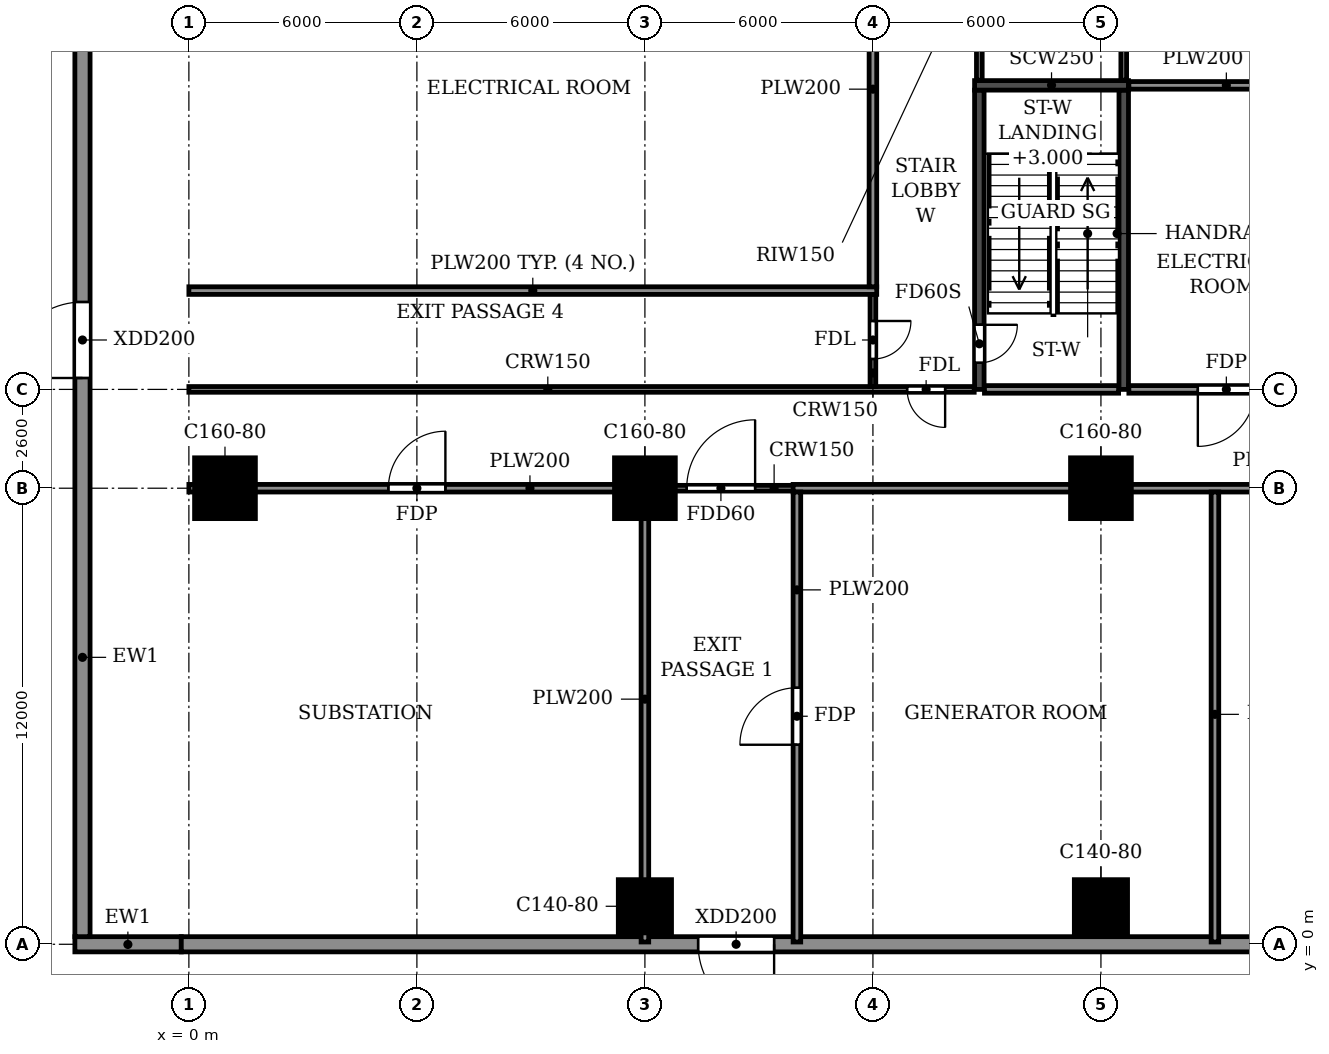
"""IFC4 building model, lengths in metres.
Left out: names, types, materials, properties, quantities, classifications, styles, units other than length and angle.
Written with IfcOpenShell. Run it as: python <this file> out.ifc"""

import sys

from ifc_helpers import new_model, si_unit, direction, frame, frame_2d, origin, origin_2d, place, context, subcontext, project, spatial, rectangle, extrude, source, transform, mapped, element, fill, save


model = new_model("IFC4")
c1 = context("Model", 3, precision=1e-05, world=origin(), true_north=direction((0.0, 1.0)))
c2 = subcontext(c1, "Body", "Model", "MODEL_VIEW")
j1 = project(units=[si_unit("LENGTHUNIT", "METRE"), si_unit("PLANEANGLEUNIT", "RADIAN")], contexts=[c1])
p1 = place(None, origin())
s1 = spatial("IfcSite", under=j1, at=p1, CompositionType="ELEMENT")
p2 = place(p1, origin())
s2 = spatial("IfcBuilding", under=s1, at=p2, CompositionType="ELEMENT")
p3 = place(p2, origin())
s3 = spatial("IfcBuildingStorey", under=s2, at=p3, CompositionType="ELEMENT", Elevation=0.0)
m1 = source(origin(), c2, "Body", "SweptSolid", [
    extrude(rectangle(XDim=1.6, YDim=1.6, at=origin_2d()), origin(), (0.0, 0.0, 1.0), 4.5),
])
p4 = place(p3, frame((0.95, 12.0, -0.3), z_axis=(0.0, 0.0, 1.0), x_axis=(1.0, 0.0, 0.0)))
e1 = element("IfcColumn", 1, at=p4, inside=s3, PredefinedType="COLUMN", context=c2, shape_type="MappedRepresentation", body=[
    mapped(m1, transform((0.0, 0.0, 0.0))),
])
m2 = source(origin(), c2, "Body", "SweptSolid", [
    extrude(rectangle(XDim=1.4, YDim=1.4, at=origin_2d()), origin(), (0.0, 0.0, 1.0), 4.5),
])
p5 = place(p3, frame((12.0, 1.0, -0.3), z_axis=(0.0, 0.0, 1.0), x_axis=(1.0, 0.0, 0.0)))
e2 = element("IfcColumn", 2, at=p5, inside=s3, PredefinedType="COLUMN", context=c2, shape_type="MappedRepresentation", body=[
    mapped(m2, transform((0.0, 0.0, 0.0))),
])
p6 = place(p3, frame((12.0, 12.0, -0.3), z_axis=(0.0, 0.0, 1.0), x_axis=(1.0, 0.0, 0.0)))
e3 = element("IfcColumn", 3, at=p6, inside=s3, PredefinedType="COLUMN", context=c2, shape_type="MappedRepresentation", body=[
    mapped(m1, transform((0.0, 0.0, 0.0))),
])
p7 = place(p3, frame((24.0, 1.0, -0.3), z_axis=(0.0, 0.0, 1.0), x_axis=(1.0, 0.0, 0.0)))
e4 = element("IfcColumn", 4, at=p7, inside=s3, PredefinedType="COLUMN", context=c2, shape_type="MappedRepresentation", body=[
    mapped(m2, transform((0.0, 0.0, 0.0))),
])
p8 = place(p3, frame((24.0, 12.0, -0.3), z_axis=(0.0, 0.0, 1.0), x_axis=(1.0, 0.0, 0.0)))
e5 = element("IfcColumn", 5, at=p8, inside=s3, PredefinedType="COLUMN", context=c2, shape_type="MappedRepresentation", body=[
    mapped(m1, transform((0.0, 0.0, 0.0))),
])
p9 = place(p3, frame((20.8, 14.6, 0.0), z_axis=(0.0, 0.0, 1.0), x_axis=(0.0, 1.0, 0.0)))
e6 = element("IfcWall", 6, at=p9, inside=s3, PredefinedType="SOLIDWALL", context=c2, shape_type="SweptSolid", body=[
    extrude(rectangle(XDim=7.875, YDim=0.25, at=frame_2d((3.938, 0.0))), origin(), (0.0, 0.0, 1.0), 4.2),
])
p10 = place(p9, frame((0.7, 0.0, 0.0)))
e7 = element("IfcOpeningElement", 7, at=p10, cuts=e6, PredefinedType="OPENING", context=c2, shape_type="SweptSolid", body=[
    extrude(rectangle(XDim=1.0, YDim=2.1, at=frame_2d((0.5, 1.05))), frame((0.0, 0.135, 0.0), z_axis=(0.0, -1.0, 0.0), x_axis=(1.0, 0.0, 0.0)), (0.0, 0.0, 1.0), 0.27),
])
p11 = place(p3, frame((24.6, 14.6, 0.0), z_axis=(0.0, 0.0, 1.0), x_axis=(0.0, 1.0, 0.0)))
e8 = element("IfcWall", 8, at=p11, inside=s3, PredefinedType="SOLIDWALL", context=c2, shape_type="SweptSolid", body=[
    extrude(rectangle(XDim=7.875, YDim=0.25, at=frame_2d((3.938, 0.0))), origin(), (0.0, 0.0, 1.0), 4.2),
])
p12 = place(p3, frame((20.675, 22.6, 0.0), z_axis=(0.0, 0.0, 1.0), x_axis=(1.0, 0.0, 0.0)))
e9 = element("IfcWall", 9, at=p12, inside=s3, PredefinedType="SOLIDWALL", context=c2, shape_type="SweptSolid", body=[
    extrude(rectangle(XDim=4.05, YDim=0.25, at=frame_2d((2.025, 0.0))), origin(), (0.0, 0.0, 1.0), 4.2),
])
p13 = place(p3, frame((-2.8, 74.6, 0.0), z_axis=(0.0, 0.0, 1.0), x_axis=(0.0, -1.0, 0.0)))
e10 = element("IfcWall", 10, at=p13, inside=s3, PredefinedType="STANDARD", context=c2, shape_type="SweptSolid", body=[
    extrude(rectangle(XDim=74.4, YDim=0.4, at=frame_2d((37.2, 0.0))), origin(), (0.0, 0.0, 1.0), 5.68),
])
p14 = place(p13, frame((5.1, 0.0, 0.9)))
e11 = element("IfcOpeningElement", 11, at=p14, cuts=e10, PredefinedType="OPENING", context=c2, shape_type="SweptSolid", body=[
    extrude(rectangle(XDim=2.2, YDim=2.7, at=frame_2d((1.1, 1.35))), frame((0.0, 0.21, 0.0), z_axis=(0.0, -1.0, 0.0), x_axis=(1.0, 0.0, 0.0)), (0.0, 0.0, 1.0), 0.42),
])
p15 = place(p13, frame((34.7, 0.0, 0.9)))
e12 = element("IfcOpeningElement", 12, at=p15, cuts=e10, PredefinedType="OPENING", context=c2, shape_type="SweptSolid", body=[
    extrude(rectangle(XDim=2.2, YDim=2.7, at=frame_2d((1.1, 1.35))), frame((0.0, 0.21, 0.0), z_axis=(0.0, -1.0, 0.0), x_axis=(1.0, 0.0, 0.0)), (0.0, 0.0, 1.0), 0.42),
])
p16 = place(p13, frame((20.1, 0.0, 0.9)))
e13 = element("IfcOpeningElement", 13, at=p16, cuts=e10, PredefinedType="OPENING", context=c2, shape_type="SweptSolid", body=[
    extrude(rectangle(XDim=2.2, YDim=2.7, at=frame_2d((1.1, 1.35))), frame((0.0, 0.21, 0.0), z_axis=(0.0, -1.0, 0.0), x_axis=(1.0, 0.0, 0.0)), (0.0, 0.0, 1.0), 0.42),
])
p17 = place(p13, frame((42.0, 0.0, 0.0)))
e14 = element("IfcOpeningElement", 14, at=p17, cuts=e10, PredefinedType="OPENING", context=c2, shape_type="SweptSolid", body=[
    extrude(rectangle(XDim=2.0, YDim=2.4, at=frame_2d((1.0, 1.2))), frame((0.0, 0.21, 0.0), z_axis=(0.0, -1.0, 0.0), x_axis=(1.0, 0.0, 0.0)), (0.0, 0.0, 1.0), 0.42),
])
p18 = place(p13, frame((57.7, 0.0, 0.0)))
e15 = element("IfcOpeningElement", 15, at=p18, cuts=e10, PredefinedType="OPENING", context=c2, shape_type="SweptSolid", body=[
    extrude(rectangle(XDim=2.0, YDim=2.4, at=frame_2d((1.0, 1.2))), frame((0.0, 0.21, 0.0), z_axis=(0.0, -1.0, 0.0), x_axis=(1.0, 0.0, 0.0)), (0.0, 0.0, 1.0), 0.42),
])
p19 = place(p3, frame((-3.0, 0.0, 0.0), z_axis=(0.0, 0.0, 1.0), x_axis=(1.0, 0.0, 0.0)))
e16 = element("IfcWall", 16, at=p19, inside=s3, PredefinedType="STANDARD", context=c2, shape_type="SweptSolid", body=[
    extrude(rectangle(XDim=2.8, YDim=0.4, at=frame_2d((1.4, 0.0))), origin(), (0.0, 0.0, 1.0), 5.68),
])
p20 = place(p3, frame((-0.2, 0.0, 0.0), z_axis=(0.0, 0.0, 1.0), x_axis=(1.0, 0.0, 0.0)))
e17 = element("IfcWall", 17, at=p20, inside=s3, PredefinedType="STANDARD", context=c2, shape_type="SweptSolid", body=[
    extrude(rectangle(XDim=102.4, YDim=0.4, at=frame_2d((51.2, 0.0))), origin(), (0.0, 0.0, 1.0), 4.2),
])
p21 = place(p20, frame((13.6, 0.0, 0.0)))
e18 = element("IfcOpeningElement", 18, at=p21, cuts=e17, PredefinedType="OPENING", context=c2, shape_type="SweptSolid", body=[
    extrude(rectangle(XDim=2.0, YDim=2.4, at=frame_2d((1.0, 1.2))), frame((0.0, 0.21, 0.0), z_axis=(0.0, -1.0, 0.0), x_axis=(1.0, 0.0, 0.0)), (0.0, 0.0, 1.0), 0.42),
])
p22 = place(p20, frame((43.2, 0.0, 0.0)))
e19 = element("IfcOpeningElement", 19, at=p22, cuts=e17, PredefinedType="OPENING", context=c2, shape_type="SweptSolid", body=[
    extrude(rectangle(XDim=1.0, YDim=2.1, at=frame_2d((0.5, 1.05))), frame((0.0, 0.21, 0.0), z_axis=(0.0, -1.0, 0.0), x_axis=(1.0, 0.0, 0.0)), (0.0, 0.0, 1.0), 0.42),
])
p23 = place(p20, frame((49.6, 0.0, 0.0)))
e20 = element("IfcOpeningElement", 20, at=p23, cuts=e17, PredefinedType="OPENING", context=c2, shape_type="SweptSolid", body=[
    extrude(rectangle(XDim=2.0, YDim=2.4, at=frame_2d((1.0, 1.2))), frame((0.0, 0.21, 0.0), z_axis=(0.0, -1.0, 0.0), x_axis=(1.0, 0.0, 0.0)), (0.0, 0.0, 1.0), 0.42),
])
p24 = place(p20, frame((55.2, 0.0, 0.0)))
e21 = element("IfcOpeningElement", 21, at=p24, cuts=e17, PredefinedType="OPENING", context=c2, shape_type="SweptSolid", body=[
    extrude(rectangle(XDim=1.0, YDim=2.1, at=frame_2d((0.5, 1.05))), frame((0.0, 0.21, 0.0), z_axis=(0.0, -1.0, 0.0), x_axis=(1.0, 0.0, 0.0)), (0.0, 0.0, 1.0), 0.42),
])
p25 = place(p20, frame((65.2, 0.0, 0.0)))
e22 = element("IfcOpeningElement", 22, at=p25, cuts=e17, PredefinedType="OPENING", context=c2, shape_type="SweptSolid", body=[
    extrude(rectangle(XDim=2.0, YDim=2.4, at=frame_2d((1.0, 1.2))), frame((0.0, 0.21, 0.0), z_axis=(0.0, -1.0, 0.0), x_axis=(1.0, 0.0, 0.0)), (0.0, 0.0, 1.0), 0.42),
])
p26 = place(p20, frame((77.2, 0.0, 0.0)))
e23 = element("IfcOpeningElement", 23, at=p26, cuts=e17, PredefinedType="OPENING", context=c2, shape_type="SweptSolid", body=[
    extrude(rectangle(XDim=2.0, YDim=2.4, at=frame_2d((1.0, 1.2))), frame((0.0, 0.21, 0.0), z_axis=(0.0, -1.0, 0.0), x_axis=(1.0, 0.0, 0.0)), (0.0, 0.0, 1.0), 0.42),
])
p27 = place(p20, frame((86.2, 0.0, 0.0)))
e24 = element("IfcOpeningElement", 24, at=p27, cuts=e17, PredefinedType="OPENING", context=c2, shape_type="SweptSolid", body=[
    extrude(rectangle(XDim=2.0, YDim=2.4, at=frame_2d((1.0, 1.2))), frame((0.0, 0.21, 0.0), z_axis=(0.0, -1.0, 0.0), x_axis=(1.0, 0.0, 0.0)), (0.0, 0.0, 1.0), 0.42),
])
p28 = place(p20, frame((90.7, 0.0, 0.0)))
e25 = element("IfcOpeningElement", 25, at=p28, cuts=e17, PredefinedType="OPENING", context=c2, shape_type="SweptSolid", body=[
    extrude(rectangle(XDim=2.0, YDim=2.4, at=frame_2d((1.0, 1.2))), frame((0.0, 0.21, 0.0), z_axis=(0.0, -1.0, 0.0), x_axis=(1.0, 0.0, 0.0)), (0.0, 0.0, 1.0), 0.42),
])
p29 = place(p20, frame((98.2, 0.0, 0.0)))
e26 = element("IfcOpeningElement", 26, at=p29, cuts=e17, PredefinedType="OPENING", context=c2, shape_type="SweptSolid", body=[
    extrude(rectangle(XDim=2.0, YDim=2.4, at=frame_2d((1.0, 1.2))), frame((0.0, 0.21, 0.0), z_axis=(0.0, -1.0, 0.0), x_axis=(1.0, 0.0, 0.0)), (0.0, 0.0, 1.0), 0.42),
])
p30 = place(p3, frame((11.9, 12.0, 0.0), z_axis=(0.0, 0.0, 1.0), x_axis=(1.0, 0.0, 0.0)))
e27 = element("IfcWall", 27, at=p30, inside=s3, PredefinedType="PARTITIONING", context=c2, shape_type="SweptSolid", body=[
    extrude(rectangle(XDim=4.2, YDim=0.15, at=frame_2d((2.1, 0.0))), origin(), (0.0, 0.0, 1.0), 4.2),
])
p31 = place(p30, frame((1.2, 0.0, 0.0)))
e28 = element("IfcOpeningElement", 28, at=p31, cuts=e27, PredefinedType="OPENING", context=c2, shape_type="SweptSolid", body=[
    extrude(rectangle(XDim=1.8, YDim=2.1, at=frame_2d((0.9, 1.05))), frame((0.0, 0.085, 0.0), z_axis=(0.0, -1.0, 0.0), x_axis=(1.0, 0.0, 0.0)), (0.0, 0.0, 1.0), 0.17),
])
p32 = place(p3, frame((0.0, 14.6, 0.0), z_axis=(0.0, 0.0, 1.0), x_axis=(1.0, 0.0, 0.0)))
e29 = element("IfcWall", 29, at=p32, inside=s3, PredefinedType="PARTITIONING", context=c2, shape_type="SweptSolid", body=[
    extrude(rectangle(XDim=20.665, YDim=0.15, at=frame_2d((10.333, 0.0))), origin(), (0.0, 0.0, 1.0), 4.2),
])
p33 = place(p32, frame((18.9, 0.0, 0.0)))
e30 = element("IfcOpeningElement", 30, at=p33, cuts=e29, PredefinedType="OPENING", context=c2, shape_type="SweptSolid", body=[
    extrude(rectangle(XDim=1.0, YDim=2.1, at=frame_2d((0.5, 1.05))), frame((0.0, 0.085, 0.0), z_axis=(0.0, -1.0, 0.0), x_axis=(1.0, 0.0, 0.0)), (0.0, 0.0, 1.0), 0.17),
])
p34 = place(p3, frame((18.0, 14.675, 0.0), z_axis=(0.0, 0.0, 1.0), x_axis=(0.0, 1.0, 0.0)))
e31 = element("IfcWall", 31, at=p34, inside=s3, PredefinedType="PARTITIONING", context=c2, shape_type="SweptSolid", body=[
    extrude(rectangle(XDim=2.425, YDim=0.15, at=frame_2d((1.212, 0.0))), origin(), (0.0, 0.0, 1.0), 4.2),
])
p35 = place(p34, frame((0.725, 0.0, 0.0)))
e32 = element("IfcOpeningElement", 32, at=p35, cuts=e31, PredefinedType="OPENING", context=c2, shape_type="SweptSolid", body=[
    extrude(rectangle(XDim=1.0, YDim=2.1, at=frame_2d((0.5, 1.05))), frame((0.0, 0.085, 0.0), z_axis=(0.0, -1.0, 0.0), x_axis=(1.0, 0.0, 0.0)), (0.0, 0.0, 1.0), 0.17),
])
p36 = place(p3, frame((0.0, 12.0, 0.0), z_axis=(0.0, 0.0, 1.0), x_axis=(1.0, 0.0, 0.0)))
e33 = element("IfcWall", 33, at=p36, inside=s3, PredefinedType="PARTITIONING", context=c2, shape_type="SweptSolid", body=[
    extrude(rectangle(XDim=12.1, YDim=0.2, at=frame_2d((6.05, 0.0))), origin(), (0.0, 0.0, 1.0), 4.2),
])
p37 = place(p36, frame((5.25, 0.0, 0.0)))
e34 = element("IfcOpeningElement", 34, at=p37, cuts=e33, PredefinedType="OPENING", context=c2, shape_type="SweptSolid", body=[
    extrude(rectangle(XDim=1.5, YDim=2.1, at=frame_2d((0.75, 1.05))), frame((0.0, 0.11, 0.0), z_axis=(0.0, -1.0, 0.0), x_axis=(1.0, 0.0, 0.0)), (0.0, 0.0, 1.0), 0.22),
])
p38 = place(p3, frame((15.9, 12.0, 0.0), z_axis=(0.0, 0.0, 1.0), x_axis=(1.0, 0.0, 0.0)))
e35 = element("IfcWall", 35, at=p38, inside=s3, PredefinedType="PARTITIONING", context=c2, shape_type="SweptSolid", body=[
    extrude(rectangle(XDim=23.2, YDim=0.2, at=frame_2d((11.6, 0.0))), origin(), (0.0, 0.0, 1.0), 4.2),
])
p39 = place(p38, frame((16.35, 0.0, 0.0)))
e36 = element("IfcOpeningElement", 36, at=p39, cuts=e35, PredefinedType="OPENING", context=c2, shape_type="SweptSolid", body=[
    extrude(rectangle(XDim=1.5, YDim=2.1, at=frame_2d((0.75, 1.05))), frame((0.0, 0.11, 0.0), z_axis=(0.0, -1.0, 0.0), x_axis=(1.0, 0.0, 0.0)), (0.0, 0.0, 1.0), 0.22),
])
p40 = place(p3, frame((24.735, 14.6, 0.0), z_axis=(0.0, 0.0, 1.0), x_axis=(1.0, 0.0, 0.0)))
e37 = element("IfcWall", 37, at=p40, inside=s3, PredefinedType="PARTITIONING", context=c2, shape_type="SweptSolid", body=[
    extrude(rectangle(XDim=5.13, YDim=0.2, at=frame_2d((2.565, 0.0))), origin(), (0.0, 0.0, 1.0), 4.2),
])
p41 = place(p40, frame((1.815, 0.0, 0.0)))
e38 = element("IfcOpeningElement", 38, at=p41, cuts=e37, PredefinedType="OPENING", context=c2, shape_type="SweptSolid", body=[
    extrude(rectangle(XDim=1.5, YDim=2.1, at=frame_2d((0.75, 1.05))), frame((0.0, 0.11, 0.0), z_axis=(0.0, -1.0, 0.0), x_axis=(1.0, 0.0, 0.0)), (0.0, 0.0, 1.0), 0.22),
])
p42 = place(p3, frame((0.0, 17.2, 0.0), z_axis=(0.0, 0.0, 1.0), x_axis=(1.0, 0.0, 0.0)))
e39 = element("IfcWall", 39, at=p42, inside=s3, PredefinedType="PARTITIONING", context=c2, shape_type="SweptSolid", body=[
    extrude(rectangle(XDim=18.1, YDim=0.2, at=frame_2d((9.05, 0.0))), origin(), (0.0, 0.0, 1.0), 4.2),
])
p43 = place(p3, frame((24.735, 22.6, 0.0), z_axis=(0.0, 0.0, 1.0), x_axis=(1.0, 0.0, 0.0)))
e40 = element("IfcWall", 40, at=p43, inside=s3, PredefinedType="PARTITIONING", context=c2, shape_type="SweptSolid", body=[
    extrude(rectangle(XDim=5.13, YDim=0.2, at=frame_2d((2.565, 0.0))), origin(), (0.0, 0.0, 1.0), 4.2),
])
p44 = place(p3, frame((12.0, 0.06, 0.0), z_axis=(0.0, 0.0, 1.0), x_axis=(0.0, 1.0, 0.0)))
e41 = element("IfcWall", 41, at=p44, inside=s3, PredefinedType="PARTITIONING", context=c2, shape_type="SweptSolid", body=[
    extrude(rectangle(XDim=11.84, YDim=0.2, at=frame_2d((5.92, 0.0))), origin(), (0.0, 0.0, 1.0), 4.2),
])
p45 = place(p3, frame((16.0, 0.06, 0.0), z_axis=(0.0, 0.0, 1.0), x_axis=(0.0, 1.0, 0.0)))
e42 = element("IfcWall", 42, at=p45, inside=s3, PredefinedType="PARTITIONING", context=c2, shape_type="SweptSolid", body=[
    extrude(rectangle(XDim=11.84, YDim=0.2, at=frame_2d((5.92, 0.0))), origin(), (0.0, 0.0, 1.0), 4.2),
])
p46 = place(p45, frame((5.19, 0.0, 0.0)))
e43 = element("IfcOpeningElement", 43, at=p46, cuts=e42, PredefinedType="OPENING", context=c2, shape_type="SweptSolid", body=[
    extrude(rectangle(XDim=1.5, YDim=2.1, at=frame_2d((0.75, 1.05))), frame((0.0, 0.11, 0.0), z_axis=(0.0, -1.0, 0.0), x_axis=(1.0, 0.0, 0.0)), (0.0, 0.0, 1.0), 0.22),
])
p47 = place(p3, frame((18.0, 17.3, 0.0), z_axis=(0.0, 0.0, 1.0), x_axis=(0.0, 1.0, 0.0)))
e44 = element("IfcWall", 44, at=p47, inside=s3, PredefinedType="PARTITIONING", context=c2, shape_type="SweptSolid", body=[
    extrude(rectangle(XDim=10.4, YDim=0.2, at=frame_2d((5.2, 0.0))), origin(), (0.0, 0.0, 1.0), 4.2),
])
p48 = place(p3, frame((27.0, 0.06, 0.0), z_axis=(0.0, 0.0, 1.0), x_axis=(0.0, 1.0, 0.0)))
e45 = element("IfcWall", 45, at=p48, inside=s3, PredefinedType="PARTITIONING", context=c2, shape_type="SweptSolid", body=[
    extrude(rectangle(XDim=11.84, YDim=0.2, at=frame_2d((5.92, 0.0))), origin(), (0.0, 0.0, 1.0), 4.2),
])
p49 = place(p3, frame((20.8, 22.735, 0.0), z_axis=(0.0, 0.0, 1.0), x_axis=(0.0, 1.0, 0.0)))
e46 = element("IfcWall", 46, at=p49, inside=s3, PredefinedType="PARTITIONING", context=c2, shape_type="SweptSolid", body=[
    extrude(rectangle(XDim=4.99, YDim=0.15, at=frame_2d((2.495, 0.0))), origin(), (0.0, 0.0, 1.0), 4.2),
])
p50 = place(p3, frame((24.6, 22.735, 0.0), z_axis=(0.0, 0.0, 1.0), x_axis=(0.0, 1.0, 0.0)))
e47 = element("IfcWall", 47, at=p50, inside=s3, PredefinedType="PARTITIONING", context=c2, shape_type="SweptSolid", body=[
    extrude(rectangle(XDim=4.965, YDim=0.15, at=frame_2d((2.482, 0.0))), origin(), (0.0, 0.0, 1.0), 4.2),
])
p51 = place(p3, frame((20.935, 14.6, 0.0), z_axis=(0.0, 0.0, 1.0), x_axis=(1.0, 0.0, 0.0)))
e48 = element("IfcWall", 48, at=p51, inside=s3, PredefinedType="PARTITIONING", context=c2, shape_type="SweptSolid", body=[
    extrude(rectangle(XDim=3.53, YDim=0.2, at=frame_2d((1.765, 0.0))), origin(), (0.0, 0.0, 1.0), 4.2),
])
p52 = place(p21, frame((2.0, 0.0, 0.0), z_axis=(0.0, 0.0, 1.0), x_axis=(-1.0, 0.0, 0.0)))
e49 = element("IfcDoor", 49, at=p52, inside=s3, OperationType="DOUBLE_DOOR_SINGLE_SWING", PredefinedType="DOOR", context=c2, shape_type="SweptSolid", body=[
    extrude(rectangle(XDim=2.0, YDim=2.4, at=frame_2d((1.0, 1.2))), frame((0.0, 0.025, 0.0), z_axis=(0.0, -1.0, 0.0), x_axis=(1.0, 0.0, 0.0)), (0.0, 0.0, 1.0), 0.05),
])
fill(e18, e49)
p53 = place(p46, origin())
e50 = element("IfcDoor", 50, at=p53, inside=s3, OperationType="DOUBLE_DOOR_SINGLE_SWING", PredefinedType="DOOR", context=c2, shape_type="SweptSolid", body=[
    extrude(rectangle(XDim=1.5, YDim=2.1, at=frame_2d((0.75, 1.05))), frame((0.0, 0.025, 0.0), z_axis=(0.0, -1.0, 0.0), x_axis=(1.0, 0.0, 0.0)), (0.0, 0.0, 1.0), 0.05),
])
fill(e43, e50)
p54 = place(p37, origin())
e51 = element("IfcDoor", 51, at=p54, inside=s3, OperationType="DOUBLE_DOOR_SINGLE_SWING", PredefinedType="DOOR", context=c2, shape_type="SweptSolid", body=[
    extrude(rectangle(XDim=1.5, YDim=2.1, at=frame_2d((0.75, 1.05))), frame((0.0, 0.025, 0.0), z_axis=(0.0, -1.0, 0.0), x_axis=(1.0, 0.0, 0.0)), (0.0, 0.0, 1.0), 0.05),
])
fill(e34, e51)
p55 = place(p31, origin())
e52 = element("IfcDoor", 52, at=p55, inside=s3, OperationType="DOUBLE_DOOR_SINGLE_SWING", PredefinedType="DOOR", context=c2, shape_type="SweptSolid", body=[
    extrude(rectangle(XDim=1.8, YDim=2.1, at=frame_2d((0.9, 1.05))), frame((0.0, 0.025, 0.0), z_axis=(0.0, -1.0, 0.0), x_axis=(1.0, 0.0, 0.0)), (0.0, 0.0, 1.0), 0.05),
])
fill(e28, e52)
p56 = place(p33, frame((1.0, 0.0, 0.0), z_axis=(0.0, 0.0, 1.0), x_axis=(-1.0, 0.0, 0.0)))
e53 = element("IfcDoor", 53, at=p56, inside=s3, OperationType="SINGLE_SWING_LEFT", PredefinedType="DOOR", context=c2, shape_type="SweptSolid", body=[
    extrude(rectangle(XDim=1.0, YDim=2.1, at=frame_2d((0.5, 1.05))), frame((0.0, 0.025, 0.0), z_axis=(0.0, -1.0, 0.0), x_axis=(1.0, 0.0, 0.0)), (0.0, 0.0, 1.0), 0.05),
])
fill(e30, e53)
p57 = place(p41, frame((1.5, 0.0, 0.0), z_axis=(0.0, 0.0, 1.0), x_axis=(-1.0, 0.0, 0.0)))
e54 = element("IfcDoor", 54, at=p57, inside=s3, OperationType="DOUBLE_DOOR_SINGLE_SWING", PredefinedType="DOOR", context=c2, shape_type="SweptSolid", body=[
    extrude(rectangle(XDim=1.5, YDim=2.1, at=frame_2d((0.75, 1.05))), frame((0.0, 0.025, 0.0), z_axis=(0.0, -1.0, 0.0), x_axis=(1.0, 0.0, 0.0)), (0.0, 0.0, 1.0), 0.05),
])
fill(e38, e54)
p58 = place(p18, frame((2.0, 0.0, 0.0), z_axis=(0.0, 0.0, 1.0), x_axis=(-1.0, 0.0, 0.0)))
e55 = element("IfcDoor", 55, at=p58, inside=s3, OperationType="DOUBLE_DOOR_SINGLE_SWING", PredefinedType="DOOR", context=c2, shape_type="SweptSolid", body=[
    extrude(rectangle(XDim=2.0, YDim=2.4, at=frame_2d((1.0, 1.2))), frame((0.0, 0.025, 0.0), z_axis=(0.0, -1.0, 0.0), x_axis=(1.0, 0.0, 0.0)), (0.0, 0.0, 1.0), 0.05),
])
fill(e15, e55)
p59 = place(p35, frame((1.0, 0.0, 0.0), z_axis=(0.0, 0.0, 1.0), x_axis=(-1.0, 0.0, 0.0)))
e56 = element("IfcDoor", 56, at=p59, inside=s3, OperationType="SINGLE_SWING_LEFT", PredefinedType="DOOR", context=c2, shape_type="SweptSolid", body=[
    extrude(rectangle(XDim=1.0, YDim=2.1, at=frame_2d((0.5, 1.05))), frame((0.0, 0.025, 0.0), z_axis=(0.0, -1.0, 0.0), x_axis=(1.0, 0.0, 0.0)), (0.0, 0.0, 1.0), 0.05),
])
fill(e32, e56)
p60 = place(p10, frame((1.0, 0.0, 0.0), z_axis=(0.0, 0.0, 1.0), x_axis=(-1.0, 0.0, 0.0)))
e57 = element("IfcDoor", 57, at=p60, inside=s3, OperationType="SINGLE_SWING_LEFT", PredefinedType="DOOR", context=c2, shape_type="SweptSolid", body=[
    extrude(rectangle(XDim=1.0, YDim=2.1, at=frame_2d((0.5, 1.05))), frame((0.0, 0.025, 0.0), z_axis=(0.0, -1.0, 0.0), x_axis=(1.0, 0.0, 0.0)), (0.0, 0.0, 1.0), 0.05),
])
fill(e7, e57)
save(model, sys.argv[1])
